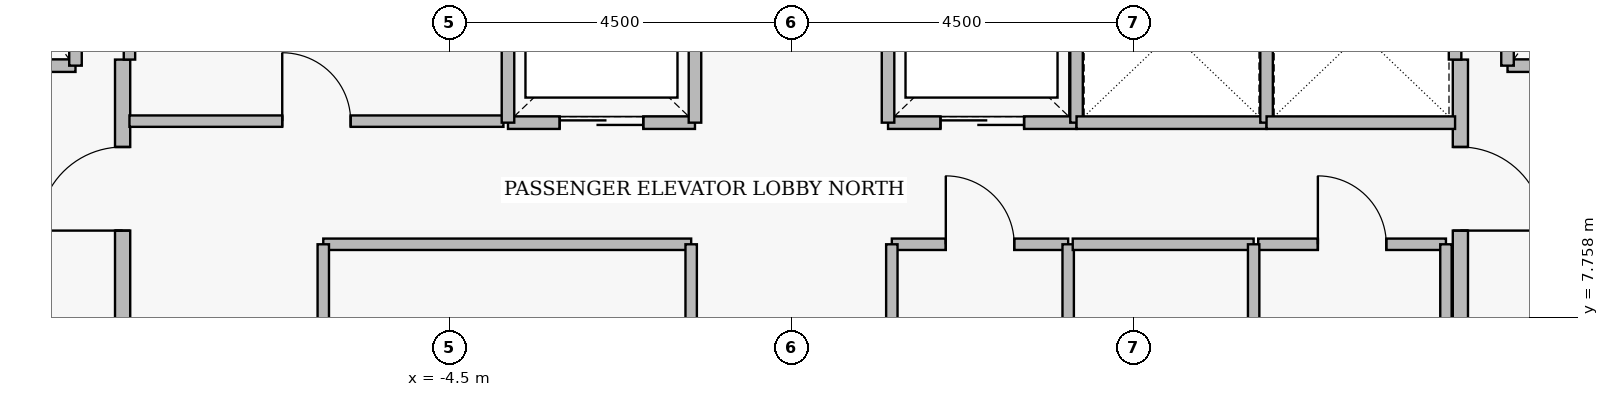
"""IFC4 building model, lengths in metres.
Left out: names, types, materials, properties, quantities, classifications, styles, units other than length and angle.
Written with IfcOpenShell. Run it as: python <this file> out.ifc"""

import sys

from ifc_helpers import new_model, si_unit, direction, frame, frame_2d, origin, place, context, subcontext, project, spatial, rectangle, extrude, element, fill, save


model = new_model("IFC4")
c1 = context("Model", 3, precision=1e-05, world=origin(), true_north=direction((0.0, 1.0)))
c2 = subcontext(c1, "Body", "Model", "MODEL_VIEW")
j1 = project(units=[si_unit("LENGTHUNIT", "METRE"), si_unit("PLANEANGLEUNIT", "RADIAN")], contexts=[c1])
p1 = place(None, origin())
s1 = spatial("IfcSite", under=j1, at=p1, CompositionType="ELEMENT")
p2 = place(p1, origin())
s2 = spatial("IfcBuilding", under=s1, at=p2, CompositionType="ELEMENT")
p3 = place(p2, frame((0.0, 0.0, 222.4)))
s3 = spatial("IfcBuildingStorey", under=s2, at=p3, CompositionType="ELEMENT", Elevation=222.4)
p4 = place(p3, frame((-8.8, 5.05, 0.0), z_axis=(0.0, 0.0, 1.0), x_axis=(0.0, 1.0, 0.0)))
e1 = element("IfcWall", 1, at=p4, inside=s3, PredefinedType="PARTITIONING", context=c2, shape_type="SweptSolid", body=[
    extrude(rectangle(XDim=6.1, YDim=0.2, at=frame_2d((3.05, 0.0))), origin(), (0.0, 0.0, 1.0), 3.53),
])
p5 = place(p4, frame((0.25, 0.0, 0.0)))
e2 = element("IfcOpeningElement", 2, at=p5, cuts=e1, PredefinedType="OPENING", context=c2, shape_type="SweptSolid", body=[
    extrude(rectangle(XDim=1.1, YDim=2.2, at=frame_2d((0.55, 1.1))), frame((0.0, 0.11, 0.0), z_axis=(0.0, -1.0, 0.0), x_axis=(1.0, 0.0, 0.0)), (0.0, 0.0, 1.0), 0.22),
])
p6 = place(p4, frame((3.85, 0.0, 0.0)))
e3 = element("IfcOpeningElement", 3, at=p6, cuts=e1, PredefinedType="OPENING", context=c2, shape_type="SweptSolid", body=[
    extrude(rectangle(XDim=1.1, YDim=2.2, at=frame_2d((0.55, 1.1))), frame((0.0, 0.11, 0.0), z_axis=(0.0, -1.0, 0.0), x_axis=(1.0, 0.0, 0.0)), (0.0, 0.0, 1.0), 0.22),
])
p7 = place(p3, frame((8.8, 11.15, 0.0), z_axis=(0.0, 0.0, 1.0), x_axis=(0.0, -1.0, 0.0)))
e4 = element("IfcWall", 4, at=p7, inside=s3, PredefinedType="PARTITIONING", context=c2, shape_type="SweptSolid", body=[
    extrude(rectangle(XDim=6.1, YDim=0.2, at=frame_2d((3.05, 0.0))), origin(), (0.0, 0.0, 1.0), 3.53),
])
p8 = place(p7, frame((1.15, 0.0, 0.0)))
e5 = element("IfcOpeningElement", 5, at=p8, cuts=e4, PredefinedType="OPENING", context=c2, shape_type="SweptSolid", body=[
    extrude(rectangle(XDim=1.1, YDim=2.2, at=frame_2d((0.55, 1.1))), frame((0.0, 0.11, 0.0), z_axis=(0.0, -1.0, 0.0), x_axis=(1.0, 0.0, 0.0)), (0.0, 0.0, 1.0), 0.22),
])
p9 = place(p7, frame((4.75, 0.0, 0.0)))
e6 = element("IfcOpeningElement", 6, at=p9, cuts=e4, PredefinedType="OPENING", context=c2, shape_type="SweptSolid", body=[
    extrude(rectangle(XDim=1.1, YDim=2.2, at=frame_2d((0.55, 1.1))), frame((0.0, 0.11, 0.0), z_axis=(0.0, -1.0, 0.0), x_axis=(1.0, 0.0, 0.0)), (0.0, 0.0, 1.0), 0.22),
])
p10 = place(p3, frame((-11.58, 11.07, 0.0), z_axis=(0.0, 0.0, 1.0), x_axis=(1.0, 0.0, 0.0)))
e7 = element("IfcWall", 7, at=p10, inside=s3, PredefinedType="PARTITIONING", context=c2, shape_type="SweptSolid", body=[
    extrude(rectangle(XDim=2.16, YDim=0.165, at=frame_2d((1.08, 0.0))), origin(), (0.0, 0.0, 1.0), 3.53),
])
p11 = place(p10, frame((0.53, 0.0, 0.0)))
e8 = element("IfcOpeningElement", 8, at=p11, cuts=e7, PredefinedType="OPENING", context=c2, shape_type="SweptSolid", body=[
    extrude(rectangle(XDim=1.15, YDim=2.25, at=frame_2d((0.575, 1.125))), frame((0.0, 0.093, 0.0), z_axis=(0.0, -1.0, 0.0), x_axis=(1.0, 0.0, 0.0)), (0.0, 0.0, 1.0), 0.185),
])
p12 = place(p3, frame((9.42, 11.07, 0.0), z_axis=(0.0, 0.0, 1.0), x_axis=(1.0, 0.0, 0.0)))
e9 = element("IfcWall", 9, at=p12, inside=s3, PredefinedType="PARTITIONING", context=c2, shape_type="SweptSolid", body=[
    extrude(rectangle(XDim=2.16, YDim=0.165, at=frame_2d((1.08, 0.0))), origin(), (0.0, 0.0, 1.0), 3.53),
])
p13 = place(p12, frame((0.53, 0.0, 0.0)))
e10 = element("IfcOpeningElement", 10, at=p13, cuts=e9, PredefinedType="OPENING", context=c2, shape_type="SweptSolid", body=[
    extrude(rectangle(XDim=1.15, YDim=2.25, at=frame_2d((0.575, 1.125))), frame((0.0, 0.093, 0.0), z_axis=(0.0, -1.0, 0.0), x_axis=(1.0, 0.0, 0.0)), (0.0, 0.0, 1.0), 0.185),
])
p14 = place(p3, frame((-3.73, 10.32, 0.0), z_axis=(0.0, 0.0, 1.0), x_axis=(1.0, 0.0, 0.0)))
e11 = element("IfcWall", 11, at=p14, inside=s3, PredefinedType="PARTITIONING", context=c2, shape_type="SweptSolid", body=[
    extrude(rectangle(XDim=2.46, YDim=0.165, at=frame_2d((1.23, 0.0))), origin(), (0.0, 0.0, 1.0), 3.53),
])
p15 = place(p14, frame((0.68, 0.0, 0.0)))
e12 = element("IfcOpeningElement", 12, at=p15, cuts=e11, PredefinedType="OPENING", context=c2, shape_type="SweptSolid", body=[
    extrude(rectangle(XDim=1.1, YDim=2.25, at=frame_2d((0.55, 1.125))), frame((0.0, 0.093, 0.0), z_axis=(0.0, -1.0, 0.0), x_axis=(1.0, 0.0, 0.0)), (0.0, 0.0, 1.0), 0.185),
])
p16 = place(p3, frame((1.27, 10.32, 0.0), z_axis=(0.0, 0.0, 1.0), x_axis=(1.0, 0.0, 0.0)))
e13 = element("IfcWall", 13, at=p16, inside=s3, PredefinedType="PARTITIONING", context=c2, shape_type="SweptSolid", body=[
    extrude(rectangle(XDim=2.48, YDim=0.165, at=frame_2d((1.24, 0.0))), origin(), (0.0, 0.0, 1.0), 3.53),
])
p17 = place(p16, frame((0.69, 0.0, 0.0)))
e14 = element("IfcOpeningElement", 14, at=p17, cuts=e13, PredefinedType="OPENING", context=c2, shape_type="SweptSolid", body=[
    extrude(rectangle(XDim=1.1, YDim=2.25, at=frame_2d((0.55, 1.125))), frame((0.0, 0.093, 0.0), z_axis=(0.0, -1.0, 0.0), x_axis=(1.0, 0.0, 0.0)), (0.0, 0.0, 1.0), 0.185),
])
p18 = place(p3, frame((-8.71, 10.34, 0.0), z_axis=(0.0, 0.0, 1.0), x_axis=(1.0, 0.0, 0.0)))
e15 = element("IfcWall", 15, at=p18, inside=s3, PredefinedType="PARTITIONING", context=c2, shape_type="SweptSolid", body=[
    extrude(rectangle(XDim=4.92, YDim=0.15, at=frame_2d((2.46, 0.0))), origin(), (0.0, 0.0, 1.0), 3.53),
])
p19 = place(p18, frame((2.01, 0.0, 0.0)))
e16 = element("IfcOpeningElement", 16, at=p19, cuts=e15, PredefinedType="OPENING", context=c2, shape_type="SweptSolid", body=[
    extrude(rectangle(XDim=0.9, YDim=2.15, at=frame_2d((0.45, 1.075))), frame((0.0, 0.085, 0.0), z_axis=(0.0, -1.0, 0.0), x_axis=(1.0, 0.0, 0.0)), (0.0, 0.0, 1.0), 0.17),
])
p20 = place(p3, frame((1.32, 8.72, 0.0), z_axis=(0.0, 0.0, 1.0), x_axis=(1.0, 0.0, 0.0)))
e17 = element("IfcWall", 17, at=p20, inside=s3, PredefinedType="PARTITIONING", context=c2, shape_type="SweptSolid", body=[
    extrude(rectangle(XDim=2.32, YDim=0.15, at=frame_2d((1.16, 0.0))), origin(), (0.0, 0.0, 1.0), 3.53),
])
p21 = place(p20, frame((0.71, 0.0, 0.0)))
e18 = element("IfcOpeningElement", 18, at=p21, cuts=e17, PredefinedType="OPENING", context=c2, shape_type="SweptSolid", body=[
    extrude(rectangle(XDim=0.9, YDim=2.15, at=frame_2d((0.45, 1.075))), frame((0.0, 0.085, 0.0), z_axis=(0.0, -1.0, 0.0), x_axis=(1.0, 0.0, 0.0)), (0.0, 0.0, 1.0), 0.17),
])
p22 = place(p3, frame((6.14, 8.72, 0.0), z_axis=(0.0, 0.0, 1.0), x_axis=(1.0, 0.0, 0.0)))
e19 = element("IfcWall", 19, at=p22, inside=s3, PredefinedType="PARTITIONING", context=c2, shape_type="SweptSolid", body=[
    extrude(rectangle(XDim=2.47, YDim=0.15, at=frame_2d((1.235, 0.0))), origin(), (0.0, 0.0, 1.0), 3.53),
])
p23 = place(p22, frame((0.785, 0.0, 0.0)))
e20 = element("IfcOpeningElement", 20, at=p23, cuts=e19, PredefinedType="OPENING", context=c2, shape_type="SweptSolid", body=[
    extrude(rectangle(XDim=0.9, YDim=2.15, at=frame_2d((0.45, 1.075))), frame((0.0, 0.085, 0.0), z_axis=(0.0, -1.0, 0.0), x_axis=(1.0, 0.0, 0.0)), (0.0, 0.0, 1.0), 0.17),
])
for number, where, z_axis, x_axis in (
    (21, (-9.42, 11.07, 0.0), (0.0, 0.0, 1.0), (0.0, 1.0, 0.0)),
    (22, (9.42, 11.07, 0.0), (0.0, 0.0, 1.0), (0.0, 1.0, 0.0)),
):
    element("IfcWall", number, at=place(p3, frame(where, z_axis=z_axis, x_axis=x_axis)), inside=s3, PredefinedType="PARTITIONING", context=c2, shape_type="SweptSolid", body=[
        extrude(rectangle(XDim=2.96, YDim=0.165, at=frame_2d((1.48, 0.0))), origin(), (0.0, 0.0, 1.0), 3.53),
    ])
for number, where, z_axis, x_axis in (
    (23, (-3.73, 10.32, 0.0), (0.0, 0.0, 1.0), (0.0, 1.0, 0.0)),
    (24, (-1.27, 10.32, 0.0), (0.0, 0.0, 1.0), (0.0, 1.0, 0.0)),
    (25, (1.27, 10.32, 0.0), (0.0, 0.0, 1.0), (0.0, 1.0, 0.0)),
    (26, (3.75, 10.32, 0.0), (0.0, 0.0, 1.0), (0.0, 1.0, 0.0)),
):
    element("IfcWall", number, at=place(p3, frame(where, z_axis=z_axis, x_axis=x_axis)), inside=s3, PredefinedType="PARTITIONING", context=c2, shape_type="SweptSolid", body=[
        extrude(rectangle(XDim=2.36, YDim=0.165, at=frame_2d((1.18, 0.0))), origin(), (0.0, 0.0, 1.0), 3.53),
    ])
p24 = place(p3, frame((3.75, 10.32, 0.0), z_axis=(0.0, 0.0, 1.0), x_axis=(1.0, 0.0, 0.0)))
e27 = element("IfcWall", 27, at=p24, inside=s3, PredefinedType="PARTITIONING", context=c2, shape_type="SweptSolid", body=[
    extrude(rectangle(XDim=2.5, YDim=0.165, at=frame_2d((1.25, 0.0))), origin(), (0.0, 0.0, 1.0), 3.53),
])
p25 = place(p3, frame((6.25, 10.32, 0.0), z_axis=(0.0, 0.0, 1.0), x_axis=(0.0, 1.0, 0.0)))
e28 = element("IfcWall", 28, at=p25, inside=s3, PredefinedType="PARTITIONING", context=c2, shape_type="SweptSolid", body=[
    extrude(rectangle(XDim=2.36, YDim=0.165, at=frame_2d((1.18, 0.0))), origin(), (0.0, 0.0, 1.0), 3.53),
])
p26 = place(p3, frame((6.25, 10.32, 0.0), z_axis=(0.0, 0.0, 1.0), x_axis=(1.0, 0.0, 0.0)))
e29 = element("IfcWall", 29, at=p26, inside=s3, PredefinedType="PARTITIONING", context=c2, shape_type="SweptSolid", body=[
    extrude(rectangle(XDim=2.48, YDim=0.165, at=frame_2d((1.24, 0.0))), origin(), (0.0, 0.0, 1.0), 3.53),
])
p27 = place(p3, frame((8.73, 11.15, 0.0), z_axis=(0.0, 0.0, 1.0), x_axis=(0.0, 1.0, 0.0)))
e30 = element("IfcWall", 30, at=p27, inside=s3, PredefinedType="PARTITIONING", context=c2, shape_type="SweptSolid", body=[
    extrude(rectangle(XDim=1.53, YDim=0.165, at=frame_2d((0.765, 0.0))), origin(), (0.0, 0.0, 1.0), 3.53),
])
p28 = place(p3, frame((-8.71, 11.15, 0.0), z_axis=(0.0, 0.0, 1.0), x_axis=(0.0, 1.0, 0.0)))
e31 = element("IfcWall", 31, at=p28, inside=s3, PredefinedType="PARTITIONING", context=c2, shape_type="SweptSolid", body=[
    extrude(rectangle(XDim=1.71, YDim=0.15, at=frame_2d((0.855, 0.0))), origin(), (0.0, 0.0, 1.0), 3.53),
])
p29 = place(p3, frame((-6.16, 8.72, 0.0), z_axis=(0.0, 0.0, 1.0), x_axis=(1.0, 0.0, 0.0)))
e32 = element("IfcWall", 32, at=p29, inside=s3, PredefinedType="PARTITIONING", context=c2, shape_type="SweptSolid", body=[
    extrude(rectangle(XDim=4.84, YDim=0.15, at=frame_2d((2.42, 0.0))), origin(), (0.0, 0.0, 1.0), 3.53),
])
for number, where, z_axis, x_axis in (
    (33, (-6.16, 6.48, 0.0), (0.0, 0.0, 1.0), (0.0, 1.0, 0.0)),
    (34, (-1.32, 6.48, 0.0), (0.0, 0.0, 1.0), (0.0, 1.0, 0.0)),
    (35, (1.32, 6.48, 0.0), (0.0, 0.0, 1.0), (0.0, 1.0, 0.0)),
    (36, (3.64, 6.48, 0.0), (0.0, 0.0, 1.0), (0.0, 1.0, 0.0)),
):
    element("IfcWall", number, at=place(p3, frame(where, z_axis=z_axis, x_axis=x_axis)), inside=s3, PredefinedType="PARTITIONING", context=c2, shape_type="SweptSolid", body=[
        extrude(rectangle(XDim=2.24, YDim=0.15, at=frame_2d((1.12, 0.0))), origin(), (0.0, 0.0, 1.0), 3.53),
    ])
p30 = place(p3, frame((3.7, 8.72, 0.0), z_axis=(0.0, 0.0, 1.0), x_axis=(1.0, 0.0, 0.0)))
e37 = element("IfcWall", 37, at=p30, inside=s3, PredefinedType="PARTITIONING", context=c2, shape_type="SweptSolid", body=[
    extrude(rectangle(XDim=2.38, YDim=0.15, at=frame_2d((1.19, 0.0))), origin(), (0.0, 0.0, 1.0), 3.53),
])
for number, where, z_axis, x_axis in (
    (38, (6.08, 6.48, 0.0), (0.0, 0.0, 1.0), (0.0, 1.0, 0.0)),
    (39, (8.61, 6.48, 0.0), (0.0, 0.0, 1.0), (0.0, 1.0, 0.0)),
):
    element("IfcWall", number, at=place(p3, frame(where, z_axis=z_axis, x_axis=x_axis)), inside=s3, PredefinedType="PARTITIONING", context=c2, shape_type="SweptSolid", body=[
        extrude(rectangle(XDim=2.24, YDim=0.15, at=frame_2d((1.12, 0.0))), origin(), (0.0, 0.0, 1.0), 3.53),
    ])
p31 = place(p6, origin())
e40 = element("IfcDoor", 40, at=p31, inside=s3, OperationType="SINGLE_SWING_LEFT", PredefinedType="DOOR", context=c2, shape_type="SweptSolid", body=[
    extrude(rectangle(XDim=1.1, YDim=2.2, at=frame_2d((0.55, 1.1))), frame((0.0, 0.025, 0.0), z_axis=(0.0, -1.0, 0.0), x_axis=(1.0, 0.0, 0.0)), (0.0, 0.0, 1.0), 0.05),
])
fill(e3, e40)
p32 = place(p8, origin())
e41 = element("IfcDoor", 41, at=p32, inside=s3, OperationType="SINGLE_SWING_RIGHT", PredefinedType="DOOR", context=c2, shape_type="SweptSolid", body=[
    extrude(rectangle(XDim=1.1, YDim=2.2, at=frame_2d((0.55, 1.1))), frame((0.0, 0.025, 0.0), z_axis=(0.0, -1.0, 0.0), x_axis=(1.0, 0.0, 0.0)), (0.0, 0.0, 1.0), 0.05),
])
fill(e5, e41)
p33 = place(p15, origin())
e42 = element("IfcDoor", 42, at=p33, inside=s3, OperationType="SLIDING_TO_LEFT", PredefinedType="DOOR", context=c2, shape_type="SweptSolid", body=[
    extrude(rectangle(XDim=1.1, YDim=2.25, at=frame_2d((0.55, 1.125))), frame((0.0, 0.025, 0.0), z_axis=(0.0, -1.0, 0.0), x_axis=(1.0, 0.0, 0.0)), (0.0, 0.0, 1.0), 0.05),
])
fill(e12, e42)
p34 = place(p17, origin())
e43 = element("IfcDoor", 43, at=p34, inside=s3, OperationType="SLIDING_TO_LEFT", PredefinedType="DOOR", context=c2, shape_type="SweptSolid", body=[
    extrude(rectangle(XDim=1.1, YDim=2.25, at=frame_2d((0.55, 1.125))), frame((0.0, 0.025, 0.0), z_axis=(0.0, -1.0, 0.0), x_axis=(1.0, 0.0, 0.0)), (0.0, 0.0, 1.0), 0.05),
])
fill(e14, e43)
p35 = place(p19, origin())
e44 = element("IfcDoor", 44, at=p35, inside=s3, OperationType="SINGLE_SWING_LEFT", PredefinedType="DOOR", context=c2, shape_type="SweptSolid", body=[
    extrude(rectangle(XDim=0.9, YDim=2.15, at=frame_2d((0.45, 1.075))), frame((0.0, 0.025, 0.0), z_axis=(0.0, -1.0, 0.0), x_axis=(1.0, 0.0, 0.0)), (0.0, 0.0, 1.0), 0.05),
])
fill(e16, e44)
p36 = place(p21, origin())
e45 = element("IfcDoor", 45, at=p36, inside=s3, OperationType="SINGLE_SWING_LEFT", PredefinedType="DOOR", context=c2, shape_type="SweptSolid", body=[
    extrude(rectangle(XDim=0.9, YDim=2.15, at=frame_2d((0.45, 1.075))), frame((0.0, 0.025, 0.0), z_axis=(0.0, -1.0, 0.0), x_axis=(1.0, 0.0, 0.0)), (0.0, 0.0, 1.0), 0.05),
])
fill(e18, e45)
p37 = place(p23, origin())
e46 = element("IfcDoor", 46, at=p37, inside=s3, OperationType="SINGLE_SWING_LEFT", PredefinedType="DOOR", context=c2, shape_type="SweptSolid", body=[
    extrude(rectangle(XDim=0.9, YDim=2.15, at=frame_2d((0.45, 1.075))), frame((0.0, 0.025, 0.0), z_axis=(0.0, -1.0, 0.0), x_axis=(1.0, 0.0, 0.0)), (0.0, 0.0, 1.0), 0.05),
])
fill(e20, e46)
save(model, sys.argv[1])
